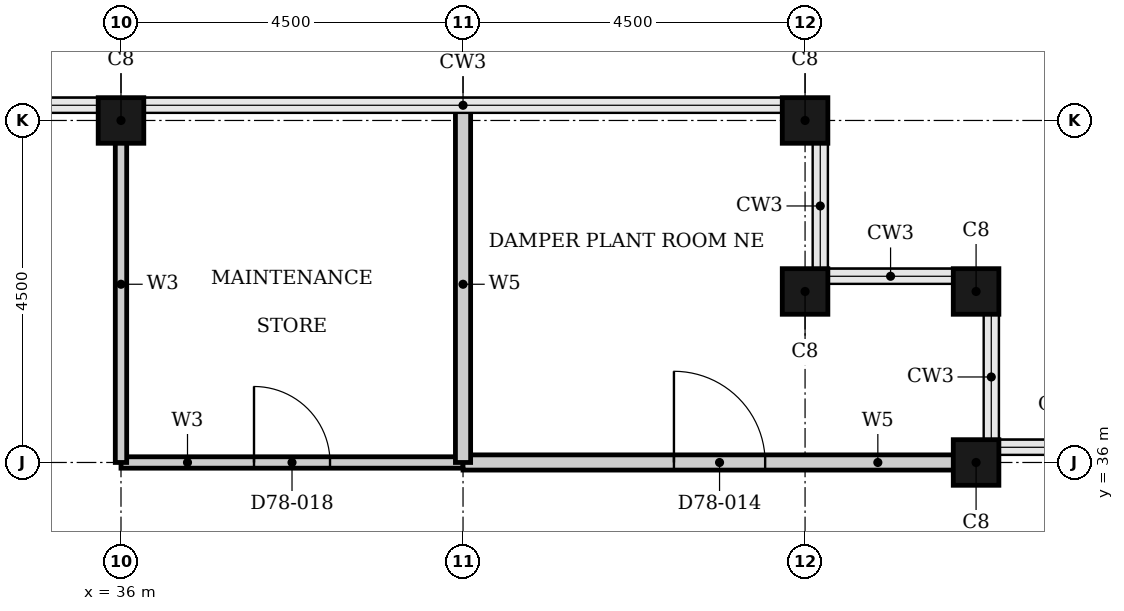
"""IFC4 building model, lengths in metres.
Left out: names, types, materials, properties, quantities, classifications, styles, units other than length and angle.
Written with IfcOpenShell. Run it as: python <this file> out.ifc"""

import sys

from ifc_helpers import new_model, si_unit, direction, frame, frame_2d, origin, origin_2d, place, context, subcontext, project, spatial, rectangle, hollow_rectangle, extrude, element, fill, save


model = new_model("IFC4")
c1 = context("Model", 3, precision=1e-05, world=origin(), true_north=direction((0.0, 1.0)))
c2 = subcontext(c1, "Body", "Model", "MODEL_VIEW")
j1 = project(units=[si_unit("LENGTHUNIT", "METRE"), si_unit("PLANEANGLEUNIT", "RADIAN")], contexts=[c1])
p1 = place(None, origin())
s1 = spatial("IfcSite", under=j1, at=p1, CompositionType="ELEMENT")
p2 = place(p1, origin())
s2 = spatial("IfcBuilding", under=s1, at=p2, CompositionType="ELEMENT")
p3 = place(p2, frame((0.0, 0.0, 305.6)))
s3 = spatial("IfcBuildingStorey", under=s2, at=p3, CompositionType="ELEMENT", Elevation=305.6)
for number, where, z_axis, x_axis in (
    (1, (47.25, 36.0, 0.0), (0.0, 0.0, 1.0), (1.0, 0.0, 0.0)),
    (2, (47.25, 38.25, 0.0), (0.0, 0.0, 1.0), (1.0, 0.0, 0.0)),
    (3, (45.0, 38.25, 0.0), (0.0, 0.0, 1.0), (1.0, 0.0, 0.0)),
    (4, (45.0, 40.5, 0.0), (0.0, 0.0, 1.0), (1.0, 0.0, 0.0)),
    (5, (36.0, 40.5, 0.0), (0.0, 0.0, 1.0), (1.0, 0.0, 0.0)),
):
    element("IfcColumn", number, at=place(p3, frame(where, z_axis=z_axis, x_axis=x_axis)), inside=s3, PredefinedType="COLUMN", context=c2, shape_type="SweptSolid", body=[
        extrude(hollow_rectangle(XDim=0.6, YDim=0.6, WallThickness=0.02, at=origin_2d()), origin(), (0.0, 0.0, 1.0), 7.2),
    ])
p4 = place(p3, frame((36.0, 36.0, 0.0), z_axis=(0.0, 0.0, 1.0), x_axis=(1.0, 0.0, 0.0)))
e6 = element("IfcWall", 6, at=p4, inside=s3, PredefinedType="PARTITIONING", context=c2, shape_type="SweptSolid", body=[
    extrude(rectangle(XDim=4.5, YDim=0.15, at=frame_2d((2.25, 0.0))), origin(), (0.0, 0.0, 1.0), 6.08),
])
p5 = place(p4, frame((1.75, 0.0, 0.0)))
e7 = element("IfcOpeningElement", 7, at=p5, cuts=e6, PredefinedType="OPENING", context=c2, shape_type="SweptSolid", body=[
    extrude(rectangle(XDim=1.0, YDim=2.1, at=frame_2d((0.5, 1.05))), frame((0.0, 0.085, 0.0), z_axis=(0.0, -1.0, 0.0), x_axis=(1.0, 0.0, 0.0)), (0.0, 0.0, 1.0), 0.17),
])
p6 = place(p3, frame((36.0, 36.0, 0.0), z_axis=(0.0, 0.0, 1.0), x_axis=(0.0, 1.0, 0.0)))
e8 = element("IfcWall", 8, at=p6, inside=s3, PredefinedType="PARTITIONING", context=c2, shape_type="SweptSolid", body=[
    extrude(rectangle(XDim=4.69, YDim=0.15, at=frame_2d((2.345, 0.0))), origin(), (0.0, 0.0, 1.0), 5.968),
])
p7 = place(p3, frame((40.5, 36.0, 0.0), z_axis=(0.0, 0.0, 1.0), x_axis=(1.0, 0.0, 0.0)))
e9 = element("IfcWall", 9, at=p7, inside=s3, PredefinedType="PARTITIONING", context=c2, shape_type="SweptSolid", body=[
    extrude(rectangle(XDim=6.94, YDim=0.2, at=frame_2d((3.47, 0.0))), origin(), (0.0, 0.0, 1.0), 6.08),
])
p8 = place(p7, frame((2.775, 0.0, 0.0)))
e10 = element("IfcOpeningElement", 10, at=p8, cuts=e9, PredefinedType="OPENING", context=c2, shape_type="SweptSolid", body=[
    extrude(rectangle(XDim=1.2, YDim=2.1, at=frame_2d((0.6, 1.05))), frame((0.0, 0.11, 0.0), z_axis=(0.0, -1.0, 0.0), x_axis=(1.0, 0.0, 0.0)), (0.0, 0.0, 1.0), 0.22),
])
p9 = place(p3, frame((40.5, 36.0, 0.0), z_axis=(0.0, 0.0, 1.0), x_axis=(0.0, 1.0, 0.0)))
e11 = element("IfcWall", 11, at=p9, inside=s3, PredefinedType="PARTITIONING", context=c2, shape_type="SweptSolid", body=[
    extrude(rectangle(XDim=4.69, YDim=0.2, at=frame_2d((2.345, 0.0))), origin(), (0.0, 0.0, 1.0), 6.9),
])
p10 = place(p8, origin())
e12 = element("IfcDoor", 12, at=p10, inside=s3, OperationType="SINGLE_SWING_RIGHT", PredefinedType="DOOR", context=c2, shape_type="SweptSolid", body=[
    extrude(rectangle(XDim=1.2, YDim=2.1, at=frame_2d((0.6, 1.05))), frame((0.0, 0.025, 0.0), z_axis=(0.0, -1.0, 0.0), x_axis=(1.0, 0.0, 0.0)), (0.0, 0.0, 1.0), 0.05),
])
fill(e10, e12)
p11 = place(p5, origin())
e13 = element("IfcDoor", 13, at=p11, inside=s3, OperationType="SINGLE_SWING_RIGHT", PredefinedType="DOOR", context=c2, shape_type="SweptSolid", body=[
    extrude(rectangle(XDim=1.0, YDim=2.1, at=frame_2d((0.5, 1.05))), frame((0.0, 0.025, 0.0), z_axis=(0.0, -1.0, 0.0), x_axis=(1.0, 0.0, 0.0)), (0.0, 0.0, 1.0), 0.05),
])
fill(e7, e13)
save(model, sys.argv[1])
